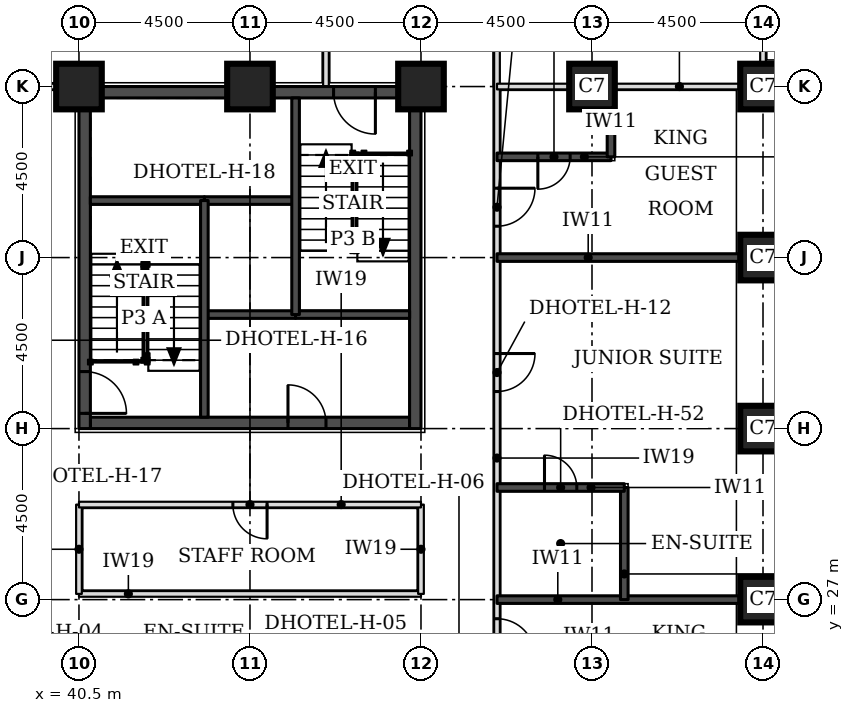
"""IFC4 building model, lengths in metres.
Left out: names, types, materials, properties, quantities, classifications, styles, units other than length and angle.
Written with IfcOpenShell. Run it as: python <this file> out.ifc"""

import sys

from ifc_helpers import new_model, si_unit, direction, frame, frame_2d, origin, origin_2d, place, context, subcontext, project, spatial, rectangle, extrude, element, fill, save


model = new_model("IFC4")
c1 = context("Model", 3, precision=1e-05, world=origin(), true_north=direction((0.0, 1.0)))
c2 = subcontext(c1, "Body", "Model", "MODEL_VIEW")
j1 = project(units=[si_unit("LENGTHUNIT", "METRE"), si_unit("PLANEANGLEUNIT", "RADIAN")], contexts=[c1])
p1 = place(None, origin())
s1 = spatial("IfcSite", under=j1, at=p1, CompositionType="ELEMENT")
p2 = place(p1, origin())
s2 = spatial("IfcBuilding", under=s1, at=p2, CompositionType="ELEMENT")
p3 = place(p2, frame((0.0, 0.0, 46.2)))
s3 = spatial("IfcBuildingStorey", under=s2, at=p3, CompositionType="ELEMENT", Elevation=46.2)
for number, where, z_axis, x_axis in (
    (1, (58.5, 27.0, 0.0), (0.0, 0.0, 1.0), (1.0, 0.0, 0.0)),
    (2, (58.5, 31.5, 0.0), (0.0, 0.0, 1.0), (1.0, 0.0, 0.0)),
    (3, (58.5, 36.0, 0.0), (0.0, 0.0, 1.0), (1.0, 0.0, 0.0)),
    (4, (40.5, 40.5, 0.0), (0.0, 0.0, 1.0), (1.0, 0.0, 0.0)),
    (5, (45.0, 40.5, 0.0), (0.0, 0.0, 1.0), (1.0, 0.0, 0.0)),
    (6, (49.5, 40.5, 0.0), (0.0, 0.0, 1.0), (1.0, 0.0, 0.0)),
    (7, (54.0, 40.5, 0.0), (0.0, 0.0, 1.0), (1.0, 0.0, 0.0)),
    (8, (58.5, 40.5, 0.0), (0.0, 0.0, 1.0), (1.0, 0.0, 0.0)),
):
    element("IfcColumn", number, at=place(p3, frame(where, z_axis=z_axis, x_axis=x_axis)), inside=s3, PredefinedType="COLUMN", context=c2, shape_type="SweptSolid", body=[
        extrude(rectangle(XDim=1.2, YDim=1.2, at=origin_2d()), origin(), (0.0, 0.0, 1.0), 3.3),
    ])
p4 = place(p3, frame((40.8, 31.65, 0.0), z_axis=(0.0, 0.0, 1.0), x_axis=(1.0, 0.0, 0.0)))
e9 = element("IfcWall", 9, at=p4, inside=s3, PredefinedType="SHEAR", context=c2, shape_type="SweptSolid", body=[
    extrude(rectangle(XDim=8.4, YDim=0.3, at=frame_2d((4.2, 0.0))), origin(), (0.0, 0.0, 1.0), 3.3),
])
p5 = place(p4, frame((5.2, 0.0, 0.0)))
e10 = element("IfcOpeningElement", 10, at=p5, cuts=e9, PredefinedType="OPENING", context=c2, shape_type="SweptSolid", body=[
    extrude(rectangle(XDim=1.0, YDim=2.1, at=frame_2d((0.5, 1.05))), frame((0.0, 0.16, 0.0), z_axis=(0.0, -1.0, 0.0), x_axis=(1.0, 0.0, 0.0)), (0.0, 0.0, 1.0), 0.32),
])
p6 = place(p3, frame((40.8, 40.35, 0.0), z_axis=(0.0, 0.0, 1.0), x_axis=(1.0, 0.0, 0.0)))
e11 = element("IfcWall", 11, at=p6, inside=s3, PredefinedType="SHEAR", context=c2, shape_type="SweptSolid", body=[
    extrude(rectangle(XDim=8.4, YDim=0.3, at=frame_2d((4.2, 0.0))), origin(), (0.0, 0.0, 1.0), 3.3),
])
p7 = place(p6, frame((6.4, 0.0, 0.0)))
e12 = element("IfcOpeningElement", 12, at=p7, cuts=e11, PredefinedType="OPENING", context=c2, shape_type="SweptSolid", body=[
    extrude(rectangle(XDim=1.1, YDim=2.1, at=frame_2d((0.55, 1.05))), frame((0.0, 0.16, 0.0), z_axis=(0.0, -1.0, 0.0), x_axis=(1.0, 0.0, 0.0)), (0.0, 0.0, 1.0), 0.32),
])
p8 = place(p3, frame((40.65, 31.5, 0.0), z_axis=(0.0, 0.0, 1.0), x_axis=(0.0, 1.0, 0.0)))
e13 = element("IfcWall", 13, at=p8, inside=s3, PredefinedType="SHEAR", context=c2, shape_type="SweptSolid", body=[
    extrude(rectangle(XDim=9.0, YDim=0.3, at=frame_2d((4.5, 0.0))), origin(), (0.0, 0.0, 1.0), 3.3),
])
p9 = place(p8, frame((0.4, 0.0, 0.0)))
e14 = element("IfcOpeningElement", 14, at=p9, cuts=e13, PredefinedType="OPENING", context=c2, shape_type="SweptSolid", body=[
    extrude(rectangle(XDim=1.1, YDim=2.1, at=frame_2d((0.55, 1.05))), frame((0.0, 0.16, 0.0), z_axis=(0.0, -1.0, 0.0), x_axis=(1.0, 0.0, 0.0)), (0.0, 0.0, 1.0), 0.32),
])
p10 = place(p3, frame((49.35, 31.5, 0.0), z_axis=(0.0, 0.0, 1.0), x_axis=(0.0, 1.0, 0.0)))
e15 = element("IfcWall", 15, at=p10, inside=s3, PredefinedType="SHEAR", context=c2, shape_type="SweptSolid", body=[
    extrude(rectangle(XDim=9.0, YDim=0.3, at=frame_2d((4.5, 0.0))), origin(), (0.0, 0.0, 1.0), 3.3),
])
p11 = place(p3, frame((51.5, 25.15, 0.0), z_axis=(0.0, 0.0, 1.0), x_axis=(0.0, 1.0, 0.0)))
e16 = element("IfcWall", 16, at=p11, inside=s3, PredefinedType="PARTITIONING", context=c2, shape_type="SweptSolid", body=[
    extrude(rectangle(XDim=22.35, YDim=0.15, at=frame_2d((11.175, 0.0))), origin(), (0.0, 0.0, 1.0), 3.08),
])
p12 = place(p11, frame((0.347, 0.0, 0.0)))
e17 = element("IfcOpeningElement", 17, at=p12, cuts=e16, PredefinedType="OPENING", context=c2, shape_type="SweptSolid", body=[
    extrude(rectangle(XDim=1.0, YDim=2.1, at=frame_2d((0.5, 1.05))), frame((0.0, 0.085, 0.0), z_axis=(0.0, -1.0, 0.0), x_axis=(1.0, 0.0, 0.0)), (0.0, 0.0, 1.0), 0.17),
])
p13 = place(p11, frame((7.325, 0.0, 0.0)))
e18 = element("IfcOpeningElement", 18, at=p13, cuts=e16, PredefinedType="OPENING", context=c2, shape_type="SweptSolid", body=[
    extrude(rectangle(XDim=1.0, YDim=2.1, at=frame_2d((0.5, 1.05))), frame((0.0, 0.085, 0.0), z_axis=(0.0, -1.0, 0.0), x_axis=(1.0, 0.0, 0.0)), (0.0, 0.0, 1.0), 0.17),
])
p14 = place(p11, frame((11.675, 0.0, 0.0)))
e19 = element("IfcOpeningElement", 19, at=p14, cuts=e16, PredefinedType="OPENING", context=c2, shape_type="SweptSolid", body=[
    extrude(rectangle(XDim=1.0, YDim=2.1, at=frame_2d((0.5, 1.05))), frame((0.0, 0.085, 0.0), z_axis=(0.0, -1.0, 0.0), x_axis=(1.0, 0.0, 0.0)), (0.0, 0.0, 1.0), 0.17),
])
p15 = place(p3, frame((40.5, 27.15, 0.0), z_axis=(0.0, 0.0, 1.0), x_axis=(1.0, 0.0, 0.0)))
e20 = element("IfcWall", 20, at=p15, inside=s3, PredefinedType="PARTITIONING", context=c2, shape_type="SweptSolid", body=[
    extrude(rectangle(XDim=9.0, YDim=0.15, at=frame_2d((4.5, 0.0))), origin(), (0.0, 0.0, 1.0), 3.08),
])
for number, where, z_axis, x_axis in (
    (21, (40.5, 27.15, 0.0), (0.0, 0.0, 1.0), (0.0, 1.0, 0.0)),
    (22, (49.5, 27.15, 0.0), (0.0, 0.0, 1.0), (0.0, 1.0, 0.0)),
):
    element("IfcWall", number, at=place(p3, frame(where, z_axis=z_axis, x_axis=x_axis)), inside=s3, PredefinedType="PARTITIONING", context=c2, shape_type="SweptSolid", body=[
        extrude(rectangle(XDim=2.35, YDim=0.15, at=frame_2d((1.175, 0.0))), origin(), (0.0, 0.0, 1.0), 3.08),
    ])
p16 = place(p3, frame((40.5, 29.5, 0.0), z_axis=(0.0, 0.0, 1.0), x_axis=(1.0, 0.0, 0.0)))
e23 = element("IfcWall", 23, at=p16, inside=s3, PredefinedType="PARTITIONING", context=c2, shape_type="SweptSolid", body=[
    extrude(rectangle(XDim=9.0, YDim=0.15, at=frame_2d((4.5, 0.0))), origin(), (0.0, 0.0, 1.0), 3.08),
])
p17 = place(p16, frame((4.05, 0.0, 0.0)))
e24 = element("IfcOpeningElement", 24, at=p17, cuts=e23, PredefinedType="OPENING", context=c2, shape_type="SweptSolid", body=[
    extrude(rectangle(XDim=0.9, YDim=2.1, at=frame_2d((0.45, 1.05))), frame((0.0, 0.085, 0.0), z_axis=(0.0, -1.0, 0.0), x_axis=(1.0, 0.0, 0.0)), (0.0, 0.0, 1.0), 0.17),
])
p18 = place(p3, frame((38.5, 40.5, 0.0), z_axis=(0.0, 0.0, 1.0), x_axis=(1.0, 0.0, 0.0)))
e25 = element("IfcWall", 25, at=p18, inside=s3, PredefinedType="PARTITIONING", context=c2, shape_type="SweptSolid", body=[
    extrude(rectangle(XDim=1.95, YDim=0.15, at=frame_2d((0.975, 0.0))), origin(), (0.0, 0.0, 1.0), 2.33),
])
p19 = place(p3, frame((47.0, 40.5, 0.0), z_axis=(0.0, 0.0, 1.0), x_axis=(0.0, 1.0, 0.0)))
e26 = element("IfcWall", 26, at=p19, inside=s3, PredefinedType="PARTITIONING", context=c2, shape_type="SweptSolid", body=[
    extrude(rectangle(XDim=7.0, YDim=0.15, at=frame_2d((3.5, 0.0))), origin(), (0.0, 0.0, 1.0), 3.08),
])
p20 = place(p19, frame((3.05, 0.0, 0.0)))
e27 = element("IfcOpeningElement", 27, at=p20, cuts=e26, PredefinedType="OPENING", context=c2, shape_type="SweptSolid", body=[
    extrude(rectangle(XDim=0.9, YDim=2.1, at=frame_2d((0.45, 1.05))), frame((0.0, 0.085, 0.0), z_axis=(0.0, -1.0, 0.0), x_axis=(1.0, 0.0, 0.0)), (0.0, 0.0, 1.0), 0.17),
])
p21 = place(p3, frame((51.5, 27.0, 0.0), z_axis=(0.0, 0.0, 1.0), x_axis=(1.0, 0.0, 0.0)))
e28 = element("IfcWall", 28, at=p21, inside=s3, PredefinedType="SOLIDWALL", context=c2, shape_type="SweptSolid", body=[
    extrude(rectangle(XDim=6.4, YDim=0.2, at=frame_2d((3.2, 0.0))), origin(), (0.0, 0.0, 1.0), 3.08),
])
p22 = place(p3, frame((54.85, 27.0, 0.0), z_axis=(0.0, 0.0, 1.0), x_axis=(0.0, 1.0, 0.0)))
e29 = element("IfcWall", 29, at=p22, inside=s3, PredefinedType="SOLIDWALL", context=c2, shape_type="SweptSolid", body=[
    extrude(rectangle(XDim=2.95, YDim=0.2, at=frame_2d((1.475, 0.0))), origin(), (0.0, 0.0, 1.0), 3.08),
])
p23 = place(p3, frame((51.5, 29.95, 0.0), z_axis=(0.0, 0.0, 1.0), x_axis=(1.0, 0.0, 0.0)))
e30 = element("IfcWall", 30, at=p23, inside=s3, PredefinedType="SOLIDWALL", context=c2, shape_type="SweptSolid", body=[
    extrude(rectangle(XDim=3.35, YDim=0.2, at=frame_2d((1.675, 0.0))), origin(), (0.0, 0.0, 1.0), 3.08),
])
p24 = place(p23, frame((1.25, 0.0, 0.0)))
e31 = element("IfcOpeningElement", 31, at=p24, cuts=e30, PredefinedType="OPENING", context=c2, shape_type="SweptSolid", body=[
    extrude(rectangle(XDim=0.85, YDim=2.1, at=frame_2d((0.425, 1.05))), frame((0.0, 0.11, 0.0), z_axis=(0.0, -1.0, 0.0), x_axis=(1.0, 0.0, 0.0)), (0.0, 0.0, 1.0), 0.22),
])
p25 = place(p3, frame((51.5, 36.0, 0.0), z_axis=(0.0, 0.0, 1.0), x_axis=(1.0, 0.0, 0.0)))
e32 = element("IfcWall", 32, at=p25, inside=s3, PredefinedType="SOLIDWALL", context=c2, shape_type="SweptSolid", body=[
    extrude(rectangle(XDim=6.4, YDim=0.2, at=frame_2d((3.2, 0.0))), origin(), (0.0, 0.0, 1.0), 3.08),
])
p26 = place(p3, frame((51.5, 38.65, 0.0), z_axis=(0.0, 0.0, 1.0), x_axis=(1.0, 0.0, 0.0)))
e33 = element("IfcWall", 33, at=p26, inside=s3, PredefinedType="SOLIDWALL", context=c2, shape_type="SweptSolid", body=[
    extrude(rectangle(XDim=3.0, YDim=0.2, at=frame_2d((1.5, 0.0))), origin(), (0.0, 0.0, 1.0), 3.08),
])
p27 = place(p26, frame((1.075, 0.0, 0.0)))
e34 = element("IfcOpeningElement", 34, at=p27, cuts=e33, PredefinedType="OPENING", context=c2, shape_type="SweptSolid", body=[
    extrude(rectangle(XDim=0.85, YDim=2.1, at=frame_2d((0.425, 1.05))), frame((0.0, 0.11, 0.0), z_axis=(0.0, -1.0, 0.0), x_axis=(1.0, 0.0, 0.0)), (0.0, 0.0, 1.0), 0.22),
])
p28 = place(p3, frame((54.5, 38.65, 0.0), z_axis=(0.0, 0.0, 1.0), x_axis=(0.0, 1.0, 0.0)))
e35 = element("IfcWall", 35, at=p28, inside=s3, PredefinedType="SOLIDWALL", context=c2, shape_type="SweptSolid", body=[
    extrude(rectangle(XDim=1.85, YDim=0.2, at=frame_2d((0.925, 0.0))), origin(), (0.0, 0.0, 1.0), 3.08),
])
p29 = place(p3, frame((51.5, 40.5, 0.0), z_axis=(0.0, 0.0, 1.0), x_axis=(1.0, 0.0, 0.0)))
e36 = element("IfcWall", 36, at=p29, inside=s3, PredefinedType="PARTITIONING", context=c2, shape_type="SweptSolid", body=[
    extrude(rectangle(XDim=6.4, YDim=0.15, at=frame_2d((3.2, 0.0))), origin(), (0.0, 0.0, 1.0), 2.33),
])
p30 = place(p3, frame((58.5, 41.1, 0.0), z_axis=(0.0, 0.0, 1.0), x_axis=(0.0, 1.0, 0.0)))
e37 = element("IfcWall", 37, at=p30, inside=s3, PredefinedType="PARTITIONING", context=c2, shape_type="SweptSolid", body=[
    extrude(rectangle(XDim=6.4, YDim=0.15, at=frame_2d((3.2, 0.0))), origin(), (0.0, 0.0, 1.0), 3.08),
])
p31 = place(p3, frame((43.8, 34.5, 0.0), z_axis=(0.0, 0.0, 1.0), x_axis=(1.0, 0.0, 0.0)))
e38 = element("IfcWall", 38, at=p31, inside=s3, PredefinedType="SOLIDWALL", context=c2, shape_type="SweptSolid", body=[
    extrude(rectangle(XDim=2.4, YDim=0.2, at=frame_2d((1.2, 0.0))), origin(), (0.0, 0.0, 1.0), 3.08),
])
p32 = place(p3, frame((46.2, 34.5, 0.0), z_axis=(0.0, 0.0, 1.0), x_axis=(1.0, 0.0, 0.0)))
e39 = element("IfcWall", 39, at=p32, inside=s3, PredefinedType="SOLIDWALL", context=c2, shape_type="SweptSolid", body=[
    extrude(rectangle(XDim=3.0, YDim=0.2, at=frame_2d((1.5, 0.0))), origin(), (0.0, 0.0, 1.0), 3.08),
])
p33 = place(p3, frame((43.8, 37.5, 0.0), z_axis=(0.0, 0.0, 1.0), x_axis=(1.0, 0.0, 0.0)))
e40 = element("IfcWall", 40, at=p33, inside=s3, PredefinedType="SOLIDWALL", context=c2, shape_type="SweptSolid", body=[
    extrude(rectangle(XDim=2.4, YDim=0.2, at=frame_2d((1.2, 0.0))), origin(), (0.0, 0.0, 1.0), 3.3),
])
p34 = place(p3, frame((40.8, 37.5, 0.0), z_axis=(0.0, 0.0, 1.0), x_axis=(1.0, 0.0, 0.0)))
e41 = element("IfcWall", 41, at=p34, inside=s3, PredefinedType="SOLIDWALL", context=c2, shape_type="SweptSolid", body=[
    extrude(rectangle(XDim=3.0, YDim=0.2, at=frame_2d((1.5, 0.0))), origin(), (0.0, 0.0, 1.0), 3.08),
])
for number, where, z_axis, x_axis in (
    (42, (43.8, 31.8, 0.0), (0.0, 0.0, 1.0), (0.0, 1.0, 0.0)),
    (43, (46.2, 34.5, 0.0), (0.0, 0.0, 1.0), (0.0, 1.0, 0.0)),
):
    element("IfcWall", number, at=place(p3, frame(where, z_axis=z_axis, x_axis=x_axis)), inside=s3, PredefinedType="SOLIDWALL", context=c2, shape_type="SweptSolid", body=[
        extrude(rectangle(XDim=5.7, YDim=0.2, at=frame_2d((2.85, 0.0))), origin(), (0.0, 0.0, 1.0), 3.08),
    ])
p35 = place(p12, frame((1.0, 0.0, 0.0), z_axis=(0.0, 0.0, 1.0), x_axis=(-1.0, 0.0, 0.0)))
e44 = element("IfcDoor", 44, at=p35, inside=s3, OperationType="SINGLE_SWING_RIGHT", PredefinedType="DOOR", context=c2, shape_type="SweptSolid", body=[
    extrude(rectangle(XDim=1.0, YDim=2.1, at=frame_2d((0.5, 1.05))), frame((0.0, 0.025, 0.0), z_axis=(0.0, -1.0, 0.0), x_axis=(1.0, 0.0, 0.0)), (0.0, 0.0, 1.0), 0.05),
])
fill(e17, e44)
p36 = place(p13, frame((1.0, 0.0, 0.0), z_axis=(0.0, 0.0, 1.0), x_axis=(-1.0, 0.0, 0.0)))
e45 = element("IfcDoor", 45, at=p36, inside=s3, OperationType="SINGLE_SWING_LEFT", PredefinedType="DOOR", context=c2, shape_type="SweptSolid", body=[
    extrude(rectangle(XDim=1.0, YDim=2.1, at=frame_2d((0.5, 1.05))), frame((0.0, 0.025, 0.0), z_axis=(0.0, -1.0, 0.0), x_axis=(1.0, 0.0, 0.0)), (0.0, 0.0, 1.0), 0.05),
])
fill(e18, e45)
p37 = place(p24, origin())
e46 = element("IfcDoor", 46, at=p37, inside=s3, OperationType="SINGLE_SWING_LEFT", PredefinedType="DOOR", context=c2, shape_type="SweptSolid", body=[
    extrude(rectangle(XDim=0.85, YDim=2.1, at=frame_2d((0.425, 1.05))), frame((0.0, 0.025, 0.0), z_axis=(0.0, -1.0, 0.0), x_axis=(1.0, 0.0, 0.0)), (0.0, 0.0, 1.0), 0.05),
])
fill(e31, e46)
p38 = place(p14, frame((1.0, 0.0, 0.0), z_axis=(0.0, 0.0, 1.0), x_axis=(-1.0, 0.0, 0.0)))
e47 = element("IfcDoor", 47, at=p38, inside=s3, OperationType="SINGLE_SWING_LEFT", PredefinedType="DOOR", context=c2, shape_type="SweptSolid", body=[
    extrude(rectangle(XDim=1.0, YDim=2.1, at=frame_2d((0.5, 1.05))), frame((0.0, 0.025, 0.0), z_axis=(0.0, -1.0, 0.0), x_axis=(1.0, 0.0, 0.0)), (0.0, 0.0, 1.0), 0.05),
])
fill(e19, e47)
p39 = place(p27, frame((0.85, 0.0, 0.0), z_axis=(0.0, 0.0, 1.0), x_axis=(-1.0, 0.0, 0.0)))
e48 = element("IfcDoor", 48, at=p39, inside=s3, OperationType="SINGLE_SWING_RIGHT", PredefinedType="DOOR", context=c2, shape_type="SweptSolid", body=[
    extrude(rectangle(XDim=0.85, YDim=2.1, at=frame_2d((0.425, 1.05))), frame((0.0, 0.025, 0.0), z_axis=(0.0, -1.0, 0.0), x_axis=(1.0, 0.0, 0.0)), (0.0, 0.0, 1.0), 0.05),
])
fill(e34, e48)
p40 = place(p17, frame((0.9, 0.0, 0.0), z_axis=(0.0, 0.0, 1.0), x_axis=(-1.0, 0.0, 0.0)))
e49 = element("IfcDoor", 49, at=p40, inside=s3, OperationType="SINGLE_SWING_LEFT", PredefinedType="DOOR", context=c2, shape_type="SweptSolid", body=[
    extrude(rectangle(XDim=0.9, YDim=2.1, at=frame_2d((0.45, 1.05))), frame((0.0, 0.025, 0.0), z_axis=(0.0, -1.0, 0.0), x_axis=(1.0, 0.0, 0.0)), (0.0, 0.0, 1.0), 0.05),
])
fill(e24, e49)
p41 = place(p9, frame((1.1, 0.0, 0.0), z_axis=(0.0, 0.0, 1.0), x_axis=(-1.0, 0.0, 0.0)))
e50 = element("IfcDoor", 50, at=p41, inside=s3, OperationType="SINGLE_SWING_RIGHT", PredefinedType="DOOR", context=c2, shape_type="SweptSolid", body=[
    extrude(rectangle(XDim=1.1, YDim=2.1, at=frame_2d((0.55, 1.05))), frame((0.0, 0.025, 0.0), z_axis=(0.0, -1.0, 0.0), x_axis=(1.0, 0.0, 0.0)), (0.0, 0.0, 1.0), 0.05),
])
fill(e14, e50)
p42 = place(p7, frame((1.1, 0.0, 0.0), z_axis=(0.0, 0.0, 1.0), x_axis=(-1.0, 0.0, 0.0)))
e51 = element("IfcDoor", 51, at=p42, inside=s3, OperationType="SINGLE_SWING_LEFT", PredefinedType="DOOR", context=c2, shape_type="SweptSolid", body=[
    extrude(rectangle(XDim=1.1, YDim=2.1, at=frame_2d((0.55, 1.05))), frame((0.0, 0.025, 0.0), z_axis=(0.0, -1.0, 0.0), x_axis=(1.0, 0.0, 0.0)), (0.0, 0.0, 1.0), 0.05),
])
fill(e12, e51)
p43 = place(p5, origin())
e52 = element("IfcDoor", 52, at=p43, inside=s3, OperationType="SINGLE_SWING_LEFT", PredefinedType="DOOR", context=c2, shape_type="SweptSolid", body=[
    extrude(rectangle(XDim=1.0, YDim=2.1, at=frame_2d((0.5, 1.05))), frame((0.0, 0.025, 0.0), z_axis=(0.0, -1.0, 0.0), x_axis=(1.0, 0.0, 0.0)), (0.0, 0.0, 1.0), 0.05),
])
fill(e10, e52)
save(model, sys.argv[1])
